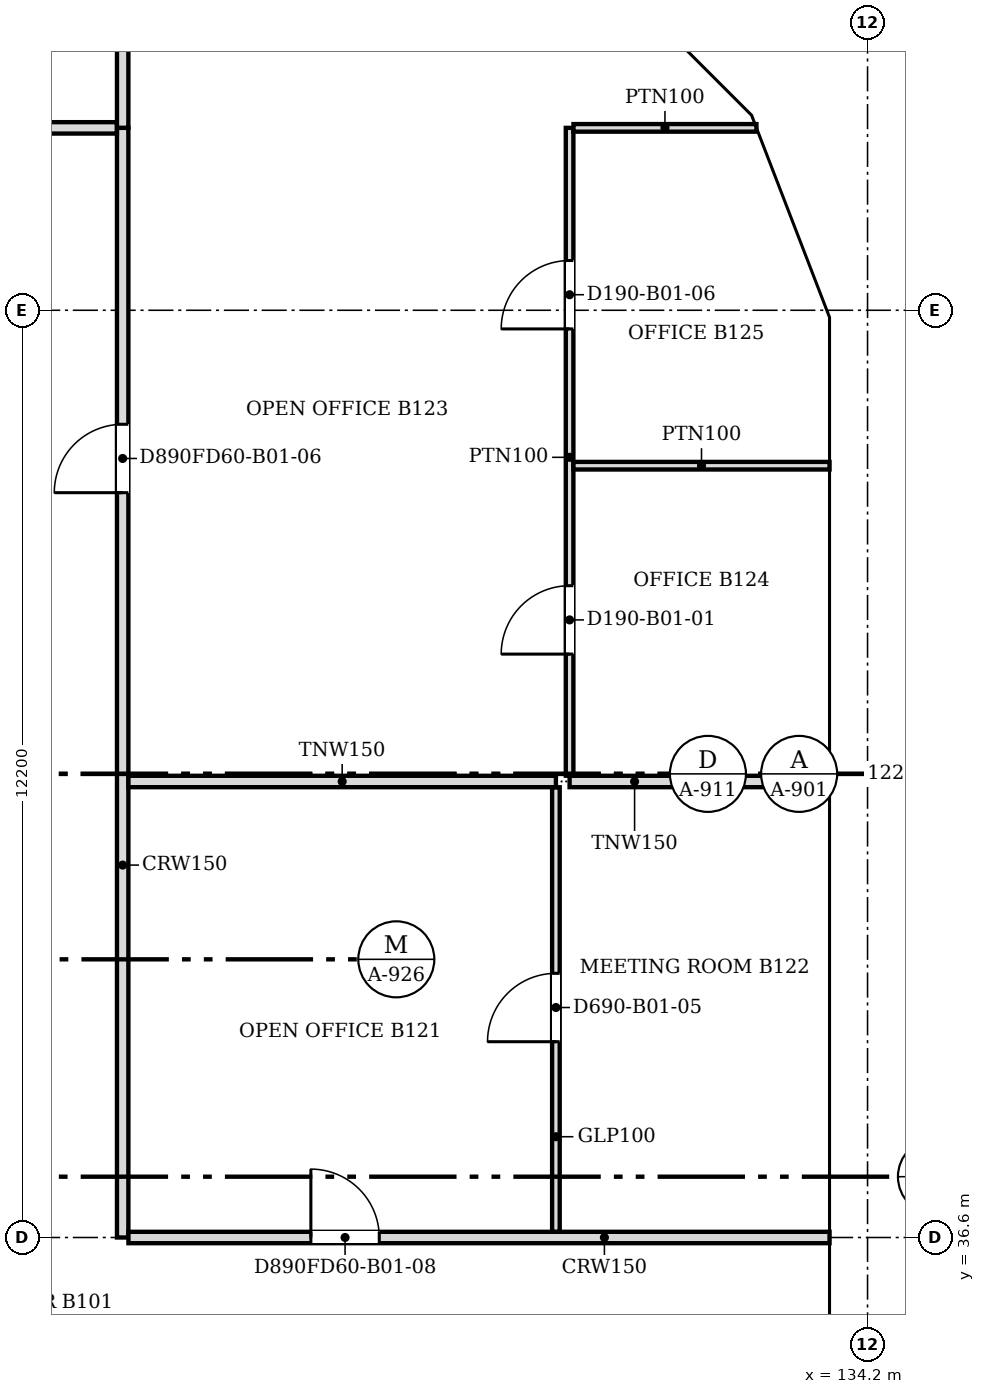
"""IFC4 building model, lengths in metres.
Left out: names, types, materials, properties, quantities, classifications, styles, units other than length and angle.
Written with IfcOpenShell. Run it as: python <this file> out.ifc"""

import sys

from ifc_helpers import new_model, si_unit, direction, frame, frame_2d, origin, place, context, subcontext, project, spatial, polyline, rectangle, outline, extrude, faceted_brep, source, transform, mapped, element, fill, save


model = new_model("IFC4")
c1 = context("Model", 3, precision=1e-05, world=origin(), true_north=direction((0.0, 1.0)))
c2 = subcontext(c1, "Body", "Model", "MODEL_VIEW")
j1 = project(units=[si_unit("LENGTHUNIT", "METRE"), si_unit("PLANEANGLEUNIT", "RADIAN")], contexts=[c1])
p1 = place(None, origin())
s1 = spatial("IfcSite", under=j1, at=p1, CompositionType="ELEMENT")
p2 = place(p1, origin())
s2 = spatial("IfcBuilding", under=s1, at=p2, CompositionType="ELEMENT")
p3 = place(p2, frame((0.0, 0.0, 16.8)))
s3 = spatial("IfcBuildingStorey", under=s2, at=p3, CompositionType="ELEMENT", Elevation=16.8)
m1 = source(origin(), c2, "Body", "SweptSolid", [
    extrude(outline(polyline([(6.1, 0.0), (3.05, 4.5), (0.0, 0.0), (6.1, 0.0)])), frame((0.0, 0.25, 0.0), z_axis=(0.0, -1.0, 0.0), x_axis=(1.0, 0.0, 0.0)), (0.0, 0.0, 1.0), 0.5),
])
p4 = place(p3, frame((133.95, 30.5, 0.0), z_axis=(0.0, 0.0, 1.0), x_axis=(0.0, 1.0, 0.0)))
e1 = element("IfcWall", 1, at=p4, inside=s3, PredefinedType="SOLIDWALL", context=c2, shape_type="MappedRepresentation", body=[
    mapped(m1, transform((0.0, 0.0, 0.0), scale=1.0)),
])
m2 = source(origin(), c2, "Body", "SweptSolid", [
    extrude(outline(polyline([(5.629, 0.25), (3.05, 4.054), (0.471, 0.25), (5.629, 0.25)])), frame((0.0, 0.26, 0.0), z_axis=(0.0, -1.0, 0.0), x_axis=(1.0, 0.0, 0.0)), (0.0, 0.0, 1.0), 0.52),
])
p5 = place(p4, origin())
e2 = element("IfcOpeningElement", 2, at=p5, cuts=e1, PredefinedType="OPENING", context=c2, shape_type="MappedRepresentation", body=[
    mapped(m2, transform((0.0, 0.0, 0.0), scale=1.0)),
])
m3 = source(origin(), c2, "Body", "Brep", [
    faceted_brep([(6.1, -0.25, 0.0), (3.05, -0.25, 4.5), (0.0, -0.25, 0.0), (6.1, -0.25, 0.0), (0.0, 0.25, 0.0), (3.05, 0.25, 4.5), (6.1, 0.25, 0.0), (6.1, 0.25, 0.0)], [[[0, 1, 2, 3]], [[4, 5, 6, 7]], [[6, 5, 1, 0]], [[5, 4, 2, 1]], [[4, 7, 3, 2]], [[3, 7, 6, 0]]]),
])
p6 = place(p3, frame((133.95, 36.6, 0.0), z_axis=(0.0, 0.0, 1.0), x_axis=(0.0, 1.0, 0.0)))
e3 = element("IfcWall", 3, at=p6, inside=s3, PredefinedType="SOLIDWALL", context=c2, shape_type="MappedRepresentation", body=[
    mapped(m3, transform((0.0, 0.0, 0.0), scale=1.0)),
])
p7 = place(p6, origin())
e4 = element("IfcOpeningElement", 4, at=p7, cuts=e3, PredefinedType="OPENING", context=c2, shape_type="MappedRepresentation", body=[
    mapped(m2, transform((0.0, 0.0, 0.0), scale=1.0)),
])
m4 = source(origin(), c2, "Body", "Brep", [
    faceted_brep([(6.053, -0.25, 0.0), (3.05, -0.25, 4.5), (0.0, -0.25, 0.0), (0.0, 0.25, 0.0), (3.05, 0.25, 4.5), (6.007, 0.25, 0.07), (6.007, 0.25, 0.0), (6.053, 0.0, 0.0)], [[[0, 1, 2]], [[3, 4, 5, 6]], [[5, 4, 1, 0, 7]], [[4, 3, 2, 1]], [[3, 6, 7, 0, 2]], [[7, 6, 5]]]),
])
p8 = place(p3, frame((133.95, 42.7, 0.0), z_axis=(0.0, 0.0, 1.0), x_axis=(0.0, 1.0, 0.0)))
e5 = element("IfcWall", 5, at=p8, inside=s3, PredefinedType="SOLIDWALL", context=c2, shape_type="MappedRepresentation", body=[
    mapped(m4, transform((0.0, 0.0, 0.0), scale=1.0)),
])
m5 = source(origin(), c2, "Body", "SweptSolid", [
    extrude(outline(polyline([(5.586, 0.25), (3.048, 4.052), (0.471, 0.25), (5.586, 0.25)])), frame((0.0, 0.26, 0.0), z_axis=(0.0, -1.0, 0.0), x_axis=(1.0, 0.0, 0.0)), (0.0, 0.0, 1.0), 0.52),
])
p9 = place(p8, origin())
e6 = element("IfcOpeningElement", 6, at=p9, cuts=e5, PredefinedType="OPENING", context=c2, shape_type="MappedRepresentation", body=[
    mapped(m5, transform((0.0, 0.0, 0.0), scale=1.0)),
])
m6 = source(origin(), c2, "Body", "Brep", [
    faceted_brep([(3.003, -0.25, 4.419), (2.95, -0.25, 4.5), (0.0, -0.25, 0.0), (3.003, -0.25, 0.0), (0.047, 0.25, 0.071), (2.898, 0.25, 4.419), (2.898, 0.25, 0.0), (0.047, 0.25, 0.0), (2.95, 0.0, 4.5), (0.0, 0.0, 0.0)], [[[0, 1, 2, 3]], [[4, 5, 6, 7]], [[8, 1, 0]], [[5, 4, 9, 2, 1, 8]], [[7, 6, 3, 2, 9]], [[7, 9, 4]], [[3, 6, 5, 8, 0]]]),
])
p10 = place(p3, frame((133.95, 48.753, 0.0), z_axis=(0.0, 0.0, 1.0), x_axis=(-0.359855894603, 0.933007896601, 0.0)))
e7 = element("IfcWall", 7, at=p10, inside=s3, PredefinedType="SOLIDWALL", context=c2, shape_type="MappedRepresentation", body=[
    mapped(m6, transform((0.0, 0.0, 0.0), scale=1.0)),
])
m7 = source(origin(), c2, "Body", "SweptSolid", [
    extrude(outline(polyline([(2.75, 3.739), (0.463, 0.25), (2.75, 0.25), (2.75, 3.739)])), frame((0.0, 0.26, 0.0), z_axis=(0.0, -1.0, 0.0), x_axis=(1.0, 0.0, 0.0)), (0.0, 0.0, 1.0), 0.52),
])
p11 = place(p10, origin())
e8 = element("IfcOpeningElement", 8, at=p11, cuts=e7, PredefinedType="OPENING", context=c2, shape_type="MappedRepresentation", body=[
    mapped(m7, transform((0.0, 0.0, 0.0), scale=1.0)),
])
m8 = source(origin(), c2, "Body", "Brep", [
    faceted_brep([(2.997, -0.25, 0.0), (0.053, -0.25, 4.5), (0.0, -0.25, 4.419), (0.0, -0.25, 0.0), (0.106, 0.25, 4.419), (2.944, 0.25, 0.081), (2.944, 0.25, 0.0), (0.106, 0.25, 0.0), (0.053, 0.0, 4.5), (2.997, 0.0, 0.0)], [[[0, 1, 2, 3]], [[4, 5, 6, 7]], [[5, 4, 8, 1, 0, 9]], [[2, 1, 8]], [[7, 6, 9, 0, 3]], [[7, 3, 2, 8, 4]], [[9, 6, 5]]]),
])
p12 = place(p3, frame((132.926, 51.469, 0.0), z_axis=(0.0, 0.0, 1.0), x_axis=(-0.707066050402, 0.707147509625, 0.0)))
e9 = element("IfcWall", 9, at=p12, inside=s3, PredefinedType="SOLIDWALL", context=c2, shape_type="MappedRepresentation", body=[
    mapped(m8, transform((0.0, 0.0, 0.0), scale=1.0)),
])
m9 = source(origin(), c2, "Body", "SweptSolid", [
    extrude(outline(polyline([(2.535, 0.25), (0.253, 3.738), (0.253, 0.25), (2.535, 0.25)])), frame((0.0, 0.26, 0.0), z_axis=(0.0, -1.0, 0.0), x_axis=(1.0, 0.0, 0.0)), (0.0, 0.0, 1.0), 0.52),
])
p13 = place(p12, origin())
e10 = element("IfcOpeningElement", 10, at=p13, cuts=e9, PredefinedType="OPENING", context=c2, shape_type="MappedRepresentation", body=[
    mapped(m9, transform((0.0, 0.0, 0.0), scale=1.0)),
])
p14 = place(p2, frame((0.0, 0.0, 21.3)))
s4 = spatial("IfcBuildingStorey", under=s2, at=p14, CompositionType="ELEMENT", Elevation=21.3)
m10 = source(origin(), c2, "Body", "Brep", [
    faceted_brep([(3.05, -0.25, 0.0), (6.1, -0.25, 4.5), (6.1, -0.25, 4.5), (3.05, -0.25, 9.0), (0.0, -0.25, 4.5), (0.0, 0.25, 4.5), (3.05, 0.25, 9.0), (6.1, 0.25, 4.5), (6.1, 0.25, 4.5), (3.05, 0.25, 0.0)], [[[0, 1, 2, 3, 4]], [[5, 6, 7, 8, 9]], [[9, 8, 1, 0]], [[7, 6, 3, 2]], [[6, 5, 4, 3]], [[5, 9, 0, 4]], [[1, 8, 7, 2]]]),
])
p15 = place(p14, frame((133.95, 33.55, -4.5), z_axis=(0.0, 0.0, 1.0), x_axis=(0.0, 1.0, 0.0)))
e11 = element("IfcWall", 11, at=p15, inside=s4, PredefinedType="SOLIDWALL", context=c2, shape_type="MappedRepresentation", body=[
    mapped(m10, transform((0.0, 0.0, 0.0), scale=1.0)),
])
m11 = source(origin(), c2, "Body", "SweptSolid", [
    extrude(outline(polyline([(3.05, 0.446), (5.798, 4.5), (3.05, 8.554), (0.302, 4.5), (3.05, 0.446)])), frame((0.0, 0.26, 0.0), z_axis=(0.0, -1.0, 0.0), x_axis=(1.0, 0.0, 0.0)), (0.0, 0.0, 1.0), 0.52),
])
p16 = place(p15, origin())
e12 = element("IfcOpeningElement", 12, at=p16, cuts=e11, PredefinedType="OPENING", context=c2, shape_type="MappedRepresentation", body=[
    mapped(m11, transform((0.0, 0.0, 0.0), scale=1.0)),
])
m12 = source(origin(), c2, "Body", "SweptSolid", [
    extrude(outline(polyline([(3.05, 0.0), (6.1, 4.5), (3.05, 9.0), (0.0, 4.5), (3.05, 0.0)])), frame((0.0, 0.25, 0.0), z_axis=(0.0, -1.0, 0.0), x_axis=(1.0, 0.0, 0.0)), (0.0, 0.0, 1.0), 0.5),
])
p17 = place(p14, frame((133.95, 39.65, -4.5), z_axis=(0.0, 0.0, 1.0), x_axis=(0.0, 1.0, 0.0)))
e13 = element("IfcWall", 13, at=p17, inside=s4, PredefinedType="SOLIDWALL", context=c2, shape_type="MappedRepresentation", body=[
    mapped(m12, transform((0.0, 0.0, 0.0), scale=1.0)),
])
p18 = place(p17, origin())
e14 = element("IfcOpeningElement", 14, at=p18, cuts=e13, PredefinedType="OPENING", context=c2, shape_type="MappedRepresentation", body=[
    mapped(m11, transform((0.0, 0.0, 0.0), scale=1.0)),
])
m13 = source(origin(), c2, "Body", "Brep", [
    faceted_brep([(3.003, -0.25, 0.0), (3.05, -0.25, 0.071), (3.05, -0.25, 8.929), (3.003, -0.25, 9.0), (0.0, -0.25, 4.5), (0.0, 0.25, 4.5), (2.957, 0.25, 8.93), (2.957, 0.25, 0.07), (3.003, 0.0, 0.0), (3.003, 0.0, 9.0)], [[[0, 1, 2, 3, 4]], [[5, 6, 7]], [[1, 0, 8]], [[9, 3, 2]], [[6, 5, 4, 3, 9]], [[5, 7, 8, 0, 4]], [[1, 8, 7, 6, 9, 2]]]),
])
p19 = place(p14, frame((133.95, 45.75, -4.5), z_axis=(0.0, 0.0, 1.0), x_axis=(0.0, 1.0, 0.0)))
e15 = element("IfcWall", 15, at=p19, inside=s4, PredefinedType="SOLIDWALL", context=c2, shape_type="MappedRepresentation", body=[
    mapped(m13, transform((0.0, 0.0, 0.0), scale=1.0)),
])
m14 = source(origin(), c2, "Body", "SweptSolid", [
    extrude(outline(polyline([(2.803, 8.25), (0.301, 4.5), (2.803, 0.75), (2.803, 8.25)])), frame((0.0, 0.26, 0.0), z_axis=(0.0, -1.0, 0.0), x_axis=(1.0, 0.0, 0.0)), (0.0, 0.0, 1.0), 0.52),
])
p20 = place(p19, origin())
e16 = element("IfcOpeningElement", 16, at=p20, cuts=e15, PredefinedType="OPENING", context=c2, shape_type="MappedRepresentation", body=[
    mapped(m14, transform((0.0, 0.0, 0.0), scale=1.0)),
])
m15 = source(origin(), c2, "Body", "Brep", [
    faceted_brep([(0.047, -0.25, 0.0), (2.997, -0.25, 4.5), (0.047, -0.25, 9.0), (0.0, -0.25, 8.93), (0.0, -0.25, 0.07), (0.093, 0.25, 8.929), (2.944, 0.25, 4.581), (2.944, 0.25, 4.419), (0.093, 0.25, 0.071), (2.997, 0.0, 4.5), (0.047, 0.0, 0.0), (0.047, 0.0, 9.0)], [[[0, 1, 2, 3, 4]], [[5, 6, 7, 8]], [[8, 7, 9, 1, 0, 10]], [[6, 5, 11, 2, 1, 9]], [[3, 2, 11]], [[10, 0, 4]], [[8, 10, 4, 3, 11, 5]], [[9, 7, 6]]]),
])
p21 = place(p14, frame((133.967, 48.71, -4.5), z_axis=(0.0, 0.0, 1.0), x_axis=(-0.359901446078, 0.932990326376, 0.0)))
e17 = element("IfcWall", 17, at=p21, inside=s4, PredefinedType="SOLIDWALL", context=c2, shape_type="MappedRepresentation", body=[
    mapped(m15, transform((0.0, 0.0, 0.0), scale=1.0)),
])
m16 = source(origin(), c2, "Body", "SweptSolid", [
    extrude(outline(polyline([(0.247, 0.761), (2.698, 4.5), (0.247, 8.239), (0.247, 0.761)])), frame((0.0, 0.26, 0.0), z_axis=(0.0, -1.0, 0.0), x_axis=(1.0, 0.0, 0.0)), (0.0, 0.0, 1.0), 0.52),
])
p22 = place(p21, origin())
e18 = element("IfcOpeningElement", 18, at=p22, cuts=e17, PredefinedType="OPENING", context=c2, shape_type="MappedRepresentation", body=[
    mapped(m16, transform((0.0, 0.0, 0.0), scale=1.0)),
])
m17 = source(origin(), c2, "Body", "Brep", [
    faceted_brep([(2.944, -0.25, 0.0), (2.997, -0.25, 0.081), (2.997, -0.25, 8.919), (2.944, -0.25, 9.0), (0.0, -0.25, 4.5), (0.053, 0.25, 4.581), (2.891, 0.25, 8.919), (2.891, 0.25, 0.081), (0.053, 0.25, 4.419), (2.944, 0.0, 0.0), (2.944, 0.0, 9.0), (0.0, 0.0, 4.5)], [[[0, 1, 2, 3, 4]], [[5, 6, 7, 8]], [[1, 0, 9]], [[10, 3, 2]], [[6, 5, 11, 4, 3, 10]], [[8, 7, 9, 0, 4, 11]], [[8, 11, 5]], [[1, 9, 7, 6, 10, 2]]]),
])
p23 = place(p14, frame((132.888, 51.506, -4.5), z_axis=(0.0, 0.0, 1.0), x_axis=(-0.707147509625, 0.707066050402, 0.0)))
e19 = element("IfcWall", 19, at=p23, inside=s4, PredefinedType="SOLIDWALL", context=c2, shape_type="MappedRepresentation", body=[
    mapped(m17, transform((0.0, 0.0, 0.0), scale=1.0)),
])
m18 = source(origin(), c2, "Body", "SweptSolid", [
    extrude(outline(polyline([(2.744, 8.238), (0.299, 4.5), (2.744, 0.762), (2.744, 8.238)])), frame((0.0, 0.26, 0.0), z_axis=(0.0, -1.0, 0.0), x_axis=(1.0, 0.0, 0.0)), (0.0, 0.0, 1.0), 0.52),
])
p24 = place(p23, origin())
e20 = element("IfcOpeningElement", 20, at=p24, cuts=e19, PredefinedType="OPENING", context=c2, shape_type="MappedRepresentation", body=[
    mapped(m18, transform((0.0, 0.0, 0.0), scale=1.0)),
])
p25 = place(p3, frame((124.4, 51.2, 0.0), z_axis=(0.0, 0.0, 1.0), x_axis=(0.0, -1.0, 0.0)))
e21 = element("IfcWall", 21, at=p25, inside=s3, PredefinedType="PARTITIONING", context=c2, shape_type="SweptSolid", body=[
    extrude(rectangle(XDim=14.6, YDim=0.15, at=frame_2d((7.3, 0.0))), origin(), (0.0, 0.0, 1.0), 3.415),
])
m19 = source(origin(), c2, "Body", "SweptSolid", [
    extrude(rectangle(XDim=0.9, YDim=2.1, at=frame_2d((0.45, 1.05))), frame((0.0, 0.085, 0.0), z_axis=(0.0, -1.0, 0.0), x_axis=(1.0, 0.0, 0.0)), (0.0, 0.0, 1.0), 0.17),
])
p26 = place(p25, frame((3.9, 0.0, 0.0)))
e22 = element("IfcOpeningElement", 22, at=p26, cuts=e21, PredefinedType="OPENING", context=c2, shape_type="MappedRepresentation", body=[
    mapped(m19, transform((0.0, 0.0, 0.0), scale=1.0)),
])
p27 = place(p3, frame((124.476, 36.6, 0.0), z_axis=(0.0, 0.0, 1.0), x_axis=(1.0, 0.0, 0.0)))
e23 = element("IfcWall", 23, at=p27, inside=s3, PredefinedType="PARTITIONING", context=c2, shape_type="SweptSolid", body=[
    extrude(rectangle(XDim=9.224, YDim=0.15, at=frame_2d((4.612, 0.0))), origin(), (0.0, 0.0, 1.0), 3.415),
])
p28 = place(p27, frame((2.4, 0.0, 0.0)))
e24 = element("IfcOpeningElement", 24, at=p28, cuts=e23, PredefinedType="OPENING", context=c2, shape_type="MappedRepresentation", body=[
    mapped(m19, transform((0.0, 0.0, 0.0), scale=1.0)),
])
p29 = place(p3, frame((130.1, 42.524, 0.0), z_axis=(0.0, 0.0, 1.0), x_axis=(0.0, -1.0, 0.0)))
e25 = element("IfcWall", 25, at=p29, inside=s3, PredefinedType="PARTITIONING", context=c2, shape_type="SweptSolid", body=[
    extrude(rectangle(XDim=5.848, YDim=0.1, at=frame_2d((2.924, 0.0))), origin(), (0.0, 0.0, 1.0), 3.415),
])
m20 = source(origin(), c2, "Body", "SweptSolid", [
    extrude(rectangle(XDim=0.9, YDim=2.1, at=frame_2d((0.45, 1.05))), frame((0.0, 0.06, 0.0), z_axis=(0.0, -1.0, 0.0), x_axis=(1.0, 0.0, 0.0)), (0.0, 0.0, 1.0), 0.12),
])
p30 = place(p29, frame((2.448, 0.0, 0.0)))
e26 = element("IfcOpeningElement", 26, at=p30, cuts=e25, PredefinedType="OPENING", context=c2, shape_type="MappedRepresentation", body=[
    mapped(m20, transform((0.0, 0.0, 0.0), scale=1.0)),
])
p31 = place(p3, frame((124.476, 42.6, 0.0), z_axis=(0.0, 0.0, 1.0), x_axis=(1.0, 0.0, 0.0)))
e27 = element("IfcWall", 27, at=p31, inside=s3, PredefinedType="PARTITIONING", context=c2, shape_type="SweptSolid", body=[
    extrude(rectangle(XDim=5.624, YDim=0.15, at=frame_2d((2.812, 0.0))), origin(), (0.0, 0.0, 1.0), 3.415),
])
p32 = place(p3, frame((130.28, 42.6, 0.0), z_axis=(0.0, 0.0, 1.0), x_axis=(1.0, 0.0, 0.0)))
e28 = element("IfcWall", 28, at=p32, inside=s3, PredefinedType="PARTITIONING", context=c2, shape_type="SweptSolid", body=[
    extrude(rectangle(XDim=3.42, YDim=0.15, at=frame_2d((1.71, 0.0))), origin(), (0.0, 0.0, 1.0), 3.415),
])
p33 = place(p3, frame((130.28, 51.2, 0.0), z_axis=(0.0, 0.0, 1.0), x_axis=(0.0, -1.0, 0.0)))
e29 = element("IfcWall", 29, at=p33, inside=s3, PredefinedType="PARTITIONING", context=c2, shape_type="SweptSolid", body=[
    extrude(rectangle(XDim=8.524, YDim=0.1, at=frame_2d((4.262, 0.0))), origin(), (0.0, 0.0, 1.0), 3.415),
])
p34 = place(p33, frame((6.024, 0.0, 0.0)))
e30 = element("IfcOpeningElement", 30, at=p34, cuts=e29, PredefinedType="OPENING", context=c2, shape_type="MappedRepresentation", body=[
    mapped(m20, transform((0.0, 0.0, 0.0), scale=1.0)),
])
p35 = place(p33, frame((1.745, 0.0, 0.0)))
e31 = element("IfcOpeningElement", 31, at=p35, cuts=e29, PredefinedType="OPENING", context=c2, shape_type="MappedRepresentation", body=[
    mapped(m20, transform((0.0, 0.0, 0.0), scale=1.0)),
])
p36 = place(p3, frame((130.331, 46.755, 0.0), z_axis=(0.0, 0.0, 1.0), x_axis=(1.0, 0.0, 0.0)))
e32 = element("IfcWall", 32, at=p36, inside=s3, PredefinedType="PARTITIONING", context=c2, shape_type="SweptSolid", body=[
    extrude(rectangle(XDim=3.369, YDim=0.1, at=frame_2d((1.685, 0.0))), origin(), (0.0, 0.0, 1.0), 3.415),
])
p37 = place(p3, frame((108.5, 51.2, 0.0), z_axis=(0.0, 0.0, 1.0), x_axis=(1.0, 0.0, 0.0)))
e33 = element("IfcWall", 33, at=p37, inside=s3, PredefinedType="PARTITIONING", context=c2, shape_type="SweptSolid", body=[
    extrude(rectangle(XDim=15.824, YDim=0.15, at=frame_2d((7.912, 0.0))), origin(), (0.0, 0.0, 1.0), 3.415),
])
p38 = place(p37, frame((11.451, 0.0, 0.0)))
e34 = element("IfcOpeningElement", 34, at=p38, cuts=e33, PredefinedType="OPENING", context=c2, shape_type="MappedRepresentation", body=[
    mapped(m19, transform((0.0, 0.0, 0.0), scale=1.0)),
])
p39 = place(p37, frame((3.6, 0.0, 0.0)))
e35 = element("IfcOpeningElement", 35, at=p39, cuts=e33, PredefinedType="OPENING", context=c2, shape_type="MappedRepresentation", body=[
    mapped(m19, transform((0.0, 0.0, 0.0), scale=1.0)),
])
p40 = place(p3, frame((124.4, 51.201, 0.0), z_axis=(0.0, 0.0, 1.0), x_axis=(0.0, 1.0, 0.0)))
e36 = element("IfcWall", 36, at=p40, inside=s3, PredefinedType="PARTITIONING", context=c2, shape_type="SweptSolid", body=[
    extrude(rectangle(XDim=3.199, YDim=0.15, at=frame_2d((1.6, 0.0))), origin(), (0.0, 0.0, 1.0), 3.415),
])
p41 = place(p3, frame((130.331, 51.2, 0.0), z_axis=(0.0, 0.0, 1.0), x_axis=(1.0, 0.0, 0.0)))
e37 = element("IfcWall", 37, at=p41, inside=s3, PredefinedType="PARTITIONING", context=c2, shape_type="SweptSolid", body=[
    extrude(rectangle(XDim=2.407, YDim=0.1, at=frame_2d((1.204, 0.0))), origin(), (0.0, 0.0, 1.0), 3.415),
])
m21 = source(origin(), c2, "Body", "SweptSolid", [
    extrude(rectangle(XDim=0.9, YDim=2.1, at=frame_2d((0.45, 1.05))), frame((0.0, 0.025, 0.0), z_axis=(0.0, -1.0, 0.0), x_axis=(1.0, 0.0, 0.0)), (0.0, 0.0, 1.0), 0.05),
])
p42 = place(p34, origin())
e38 = element("IfcDoor", 38, at=p42, inside=s3, OperationType="SINGLE_SWING_RIGHT", PredefinedType="DOOR", context=c2, shape_type="MappedRepresentation", body=[
    mapped(m21, transform((0.0, 0.0, 0.0), scale=1.0)),
])
fill(e30, e38)
p43 = place(p30, origin())
e39 = element("IfcDoor", 39, at=p43, inside=s3, OperationType="SINGLE_SWING_RIGHT", PredefinedType="DOOR", context=c2, shape_type="MappedRepresentation", body=[
    mapped(m21, transform((0.0, 0.0, 0.0), scale=1.0)),
])
fill(e26, e39)
p44 = place(p35, origin())
e40 = element("IfcDoor", 40, at=p44, inside=s3, OperationType="SINGLE_SWING_RIGHT", PredefinedType="DOOR", context=c2, shape_type="MappedRepresentation", body=[
    mapped(m21, transform((0.0, 0.0, 0.0), scale=1.0)),
])
fill(e31, e40)
p45 = place(p26, origin())
e41 = element("IfcDoor", 41, at=p45, inside=s3, OperationType="SINGLE_SWING_RIGHT", PredefinedType="DOOR", context=c2, shape_type="MappedRepresentation", body=[
    mapped(m21, transform((0.0, 0.0, 0.0), scale=1.0)),
])
fill(e22, e41)
p46 = place(p28, origin())
e42 = element("IfcDoor", 42, at=p46, inside=s3, OperationType="SINGLE_SWING_LEFT", PredefinedType="DOOR", context=c2, shape_type="MappedRepresentation", body=[
    mapped(m21, transform((0.0, 0.0, 0.0), scale=1.0)),
])
fill(e24, e42)
save(model, sys.argv[1])
